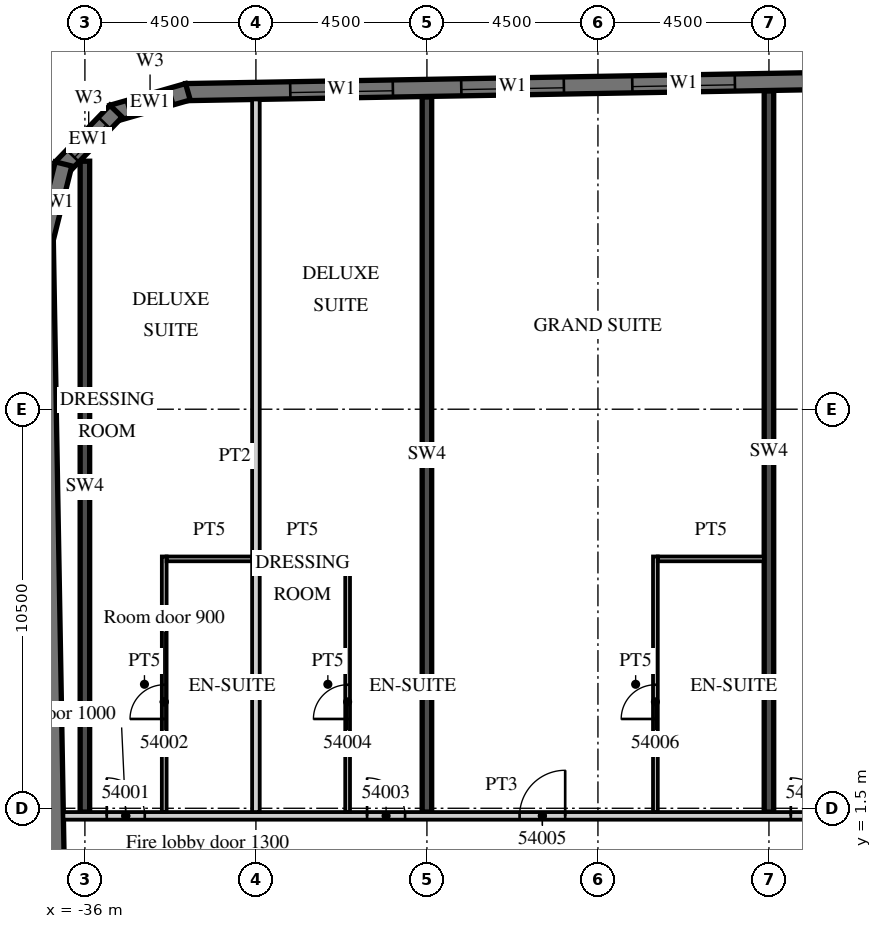
"""IFC4 building model, lengths in metres.
Left out: names, types, materials, properties, quantities, classifications, styles, units other than length and angle.
Written with IfcOpenShell. Run it as: python <this file> out.ifc"""

import sys

from ifc_helpers import new_model, si_unit, direction, frame, frame_2d, origin, place, context, subcontext, project, spatial, polyline, rectangle, outline, extrude, element, fill, save


model = new_model("IFC4")
c1 = context("Model", 3, precision=1e-05, world=origin(), true_north=direction((0.0, 1.0)))
c2 = subcontext(c1, "Body", "Model", "MODEL_VIEW")
j1 = project(units=[si_unit("LENGTHUNIT", "METRE"), si_unit("PLANEANGLEUNIT", "RADIAN")], contexts=[c1])
p1 = place(None, origin())
s1 = spatial("IfcSite", under=j1, at=p1, CompositionType="ELEMENT")
p2 = place(p1, origin())
s2 = spatial("IfcBuilding", under=s1, at=p2, CompositionType="ELEMENT")
p3 = place(p2, frame((0.0, 0.0, 224.3)))
s3 = spatial("IfcBuildingStorey", under=s2, at=p3, CompositionType="ELEMENT", Elevation=224.3)
p4 = place(p3, frame((-36.0, 1.4, 0.0), z_axis=(0.0, 0.0, 1.0), x_axis=(0.0, 1.0, 0.0)))
e1 = element("IfcWall", 1, at=p4, inside=s3, PredefinedType="SHEAR", context=c2, shape_type="SweptSolid", body=[
    extrude(rectangle(XDim=17.125, YDim=0.25, at=frame_2d((8.563, 0.0))), origin(), (0.0, 0.0, 1.0), 3.3),
])
p5 = place(p3, frame((-27.0, 1.4, 0.0), z_axis=(0.0, 0.0, 1.0), x_axis=(0.0, 1.0, 0.0)))
e2 = element("IfcWall", 2, at=p5, inside=s3, PredefinedType="SHEAR", context=c2, shape_type="SweptSolid", body=[
    extrude(rectangle(XDim=18.817, YDim=0.25, at=frame_2d((9.409, 0.0))), origin(), (0.0, 0.0, 1.0), 3.3),
])
p6 = place(p3, frame((-18.0, 1.4, 0.0), z_axis=(0.0, 0.0, 1.0), x_axis=(0.0, 1.0, 0.0)))
e3 = element("IfcWall", 3, at=p6, inside=s3, PredefinedType="SHEAR", context=c2, shape_type="SweptSolid", body=[
    extrude(rectangle(XDim=18.974, YDim=0.25, at=frame_2d((9.487, 0.0))), origin(), (0.0, 0.0, 1.0), 3.3),
])
p7 = place(p3, frame((-37.057, 16.503, 0.0), z_axis=(0.0, 0.0, 1.0), x_axis=(0.017452279857, -0.999847697366, 0.0)))
e4 = element("IfcWall", 4, at=p7, inside=s3, PredefinedType="SOLIDWALL", context=c2, shape_type="SweptSolid", body=[
    extrude(rectangle(XDim=33.0, YDim=0.45, at=frame_2d((16.5, 0.0))), origin(), (0.0, 0.0, 1.0), 3.02),
])
p8 = place(p3, frame((13.504, 21.161, 0.0), z_axis=(0.0, 0.0, 1.0), x_axis=(-0.999847763257, -0.017448504532, 0.0)))
e5 = element("IfcWall", 5, at=p8, inside=s3, PredefinedType="SOLIDWALL", context=c2, shape_type="SweptSolid", body=[
    extrude(rectangle(XDim=46.859, YDim=0.45, at=frame_2d((23.43, 0.0))), origin(), (0.0, 0.0, 1.0), 3.02),
])
p9 = place(p8, frame((0.9, 0.0, 0.45)))
e6 = element("IfcOpeningElement", 6, at=p9, cuts=e5, PredefinedType="OPENING", context=c2, shape_type="SweptSolid", body=[
    extrude(rectangle(XDim=2.7, YDim=2.25, at=frame_2d((1.35, 1.125))), frame((0.0, 0.235, 0.0), z_axis=(0.0, -1.0, 0.0), x_axis=(1.0, 0.0, 0.0)), (0.0, 0.0, 1.0), 0.47),
])
p10 = place(p8, frame((5.401, 0.0, 0.45)))
e7 = element("IfcOpeningElement", 7, at=p10, cuts=e5, PredefinedType="OPENING", context=c2, shape_type="SweptSolid", body=[
    extrude(rectangle(XDim=2.7, YDim=2.25, at=frame_2d((1.35, 1.125))), frame((0.0, 0.235, 0.0), z_axis=(0.0, -1.0, 0.0), x_axis=(1.0, 0.0, 0.0)), (0.0, 0.0, 1.0), 0.47),
])
p11 = place(p8, frame((9.902, 0.0, 0.45)))
e8 = element("IfcOpeningElement", 8, at=p11, cuts=e5, PredefinedType="OPENING", context=c2, shape_type="SweptSolid", body=[
    extrude(rectangle(XDim=2.7, YDim=2.25, at=frame_2d((1.35, 1.125))), frame((0.0, 0.235, 0.0), z_axis=(0.0, -1.0, 0.0), x_axis=(1.0, 0.0, 0.0)), (0.0, 0.0, 1.0), 0.47),
])
p12 = place(p8, frame((14.402, 0.0, 0.45)))
e9 = element("IfcOpeningElement", 9, at=p12, cuts=e5, PredefinedType="OPENING", context=c2, shape_type="SweptSolid", body=[
    extrude(rectangle(XDim=2.7, YDim=2.25, at=frame_2d((1.35, 1.125))), frame((0.0, 0.235, 0.0), z_axis=(0.0, -1.0, 0.0), x_axis=(1.0, 0.0, 0.0)), (0.0, 0.0, 1.0), 0.47),
])
p13 = place(p8, frame((18.903, 0.0, 0.45)))
e10 = element("IfcOpeningElement", 10, at=p13, cuts=e5, PredefinedType="OPENING", context=c2, shape_type="SweptSolid", body=[
    extrude(rectangle(XDim=2.7, YDim=2.25, at=frame_2d((1.35, 1.125))), frame((0.0, 0.235, 0.0), z_axis=(0.0, -1.0, 0.0), x_axis=(1.0, 0.0, 0.0)), (0.0, 0.0, 1.0), 0.47),
])
p14 = place(p8, frame((23.404, 0.0, 0.45)))
e11 = element("IfcOpeningElement", 11, at=p14, cuts=e5, PredefinedType="OPENING", context=c2, shape_type="SweptSolid", body=[
    extrude(rectangle(XDim=2.7, YDim=2.25, at=frame_2d((1.35, 1.125))), frame((0.0, 0.235, 0.0), z_axis=(0.0, -1.0, 0.0), x_axis=(1.0, 0.0, 0.0)), (0.0, 0.0, 1.0), 0.47),
])
p15 = place(p8, frame((27.904, 0.0, 0.45)))
e12 = element("IfcOpeningElement", 12, at=p15, cuts=e5, PredefinedType="OPENING", context=c2, shape_type="SweptSolid", body=[
    extrude(rectangle(XDim=2.7, YDim=2.25, at=frame_2d((1.35, 1.125))), frame((0.0, 0.235, 0.0), z_axis=(0.0, -1.0, 0.0), x_axis=(1.0, 0.0, 0.0)), (0.0, 0.0, 1.0), 0.47),
])
p16 = place(p8, frame((32.405, 0.0, 0.45)))
e13 = element("IfcOpeningElement", 13, at=p16, cuts=e5, PredefinedType="OPENING", context=c2, shape_type="SweptSolid", body=[
    extrude(rectangle(XDim=2.7, YDim=2.25, at=frame_2d((1.35, 1.125))), frame((0.0, 0.235, 0.0), z_axis=(0.0, -1.0, 0.0), x_axis=(1.0, 0.0, 0.0)), (0.0, 0.0, 1.0), 0.47),
])
p17 = place(p8, frame((36.906, 0.0, 0.45)))
e14 = element("IfcOpeningElement", 14, at=p17, cuts=e5, PredefinedType="OPENING", context=c2, shape_type="SweptSolid", body=[
    extrude(rectangle(XDim=2.7, YDim=2.25, at=frame_2d((1.35, 1.125))), frame((0.0, 0.235, 0.0), z_axis=(0.0, -1.0, 0.0), x_axis=(1.0, 0.0, 0.0)), (0.0, 0.0, 1.0), 0.47),
])
p18 = place(p8, frame((41.406, 0.0, 0.45)))
e15 = element("IfcOpeningElement", 15, at=p18, cuts=e5, PredefinedType="OPENING", context=c2, shape_type="SweptSolid", body=[
    extrude(rectangle(XDim=2.7, YDim=2.25, at=frame_2d((1.35, 1.125))), frame((0.0, 0.235, 0.0), z_axis=(0.0, -1.0, 0.0), x_axis=(1.0, 0.0, 0.0)), (0.0, 0.0, 1.0), 0.47),
])
p19 = place(p3, frame((-33.29, 20.352, 0.0), z_axis=(0.0, 0.0, 1.0), x_axis=(-0.961247584925, -0.275686562016, 0.0)))
e16 = element("IfcWall", 16, at=p19, inside=s3, PredefinedType="SOLIDWALL", context=c2, shape_type="SweptSolid", body=[
    extrude(outline(polyline([(0.0, -0.225), (2.071, -0.225), (1.95, 0.225), (0.121, 0.225), (0.0, -0.225)])), origin(), (0.0, 0.0, 1.0), 3.02),
])
p20 = place(p19, frame((0.435, 0.0, 0.45)))
e17 = element("IfcOpeningElement", 17, at=p20, cuts=e16, PredefinedType="OPENING", context=c2, shape_type="SweptSolid", body=[
    extrude(rectangle(XDim=1.2, YDim=2.25, at=frame_2d((0.6, 1.125))), frame((0.0, 0.235, 0.0), z_axis=(0.0, -1.0, 0.0), x_axis=(1.0, 0.0, 0.0)), (0.0, 0.0, 1.0), 0.47),
])
p21 = place(p3, frame((-35.181, 19.842, 0.0), z_axis=(0.0, 0.0, 1.0), x_axis=(-0.694678672846, -0.719320193998, 0.0)))
e18 = element("IfcWall", 18, at=p21, inside=s3, PredefinedType="SOLIDWALL", context=c2, shape_type="SweptSolid", body=[
    extrude(outline(polyline([(0.0, -0.225), (2.071, -0.225), (1.95, 0.225), (0.121, 0.225), (0.0, -0.225)])), origin(), (0.0, 0.0, 1.0), 3.02),
])
p22 = place(p21, frame((0.435, 0.0, 0.45)))
e19 = element("IfcOpeningElement", 19, at=p22, cuts=e18, PredefinedType="OPENING", context=c2, shape_type="SweptSolid", body=[
    extrude(rectangle(XDim=1.2, YDim=2.25, at=frame_2d((0.6, 1.125))), frame((0.0, 0.235, 0.0), z_axis=(0.0, -1.0, 0.0), x_axis=(1.0, 0.0, 0.0)), (0.0, 0.0, 1.0), 0.47),
])
p23 = place(p3, frame((-36.563, 18.454, 0.0), z_axis=(0.0, 0.0, 1.0), x_axis=(-0.241869623482, -0.970308757683, 0.0)))
e20 = element("IfcWall", 20, at=p23, inside=s3, PredefinedType="SOLIDWALL", context=c2, shape_type="SweptSolid", body=[
    extrude(outline(polyline([(-0.0, -0.225), (2.07, -0.225), (1.95, 0.225), (0.12, 0.225), (-0.0, -0.225)])), origin(), (0.0, 0.0, 1.0), 3.02),
])
p24 = place(p3, frame((-36.566, 1.3, 0.0), z_axis=(0.0, 0.0, 1.0), x_axis=(1.0, 0.0, 0.0)))
e21 = element("IfcWall", 21, at=p24, inside=s3, PredefinedType="PARTITIONING", context=c2, shape_type="SweptSolid", body=[
    extrude(rectangle(XDim=23.066, YDim=0.2, at=frame_2d((11.533, 0.0))), origin(), (0.0, 0.0, 1.0), 3.02),
])
p25 = place(p24, frame((1.141, 0.0, 0.0)))
e22 = element("IfcOpeningElement", 22, at=p25, cuts=e21, PredefinedType="OPENING", context=c2, shape_type="SweptSolid", body=[
    extrude(rectangle(XDim=1.0, YDim=2.1, at=frame_2d((0.5, 1.05))), frame((0.0, 0.11, 0.0), z_axis=(0.0, -1.0, 0.0), x_axis=(1.0, 0.0, 0.0)), (0.0, 0.0, 1.0), 0.22),
])
p26 = place(p24, frame((7.991, 0.0, 0.0)))
e23 = element("IfcOpeningElement", 23, at=p26, cuts=e21, PredefinedType="OPENING", context=c2, shape_type="SweptSolid", body=[
    extrude(rectangle(XDim=1.0, YDim=2.1, at=frame_2d((0.5, 1.05))), frame((0.0, 0.11, 0.0), z_axis=(0.0, -1.0, 0.0), x_axis=(1.0, 0.0, 0.0)), (0.0, 0.0, 1.0), 0.22),
])
p27 = place(p24, frame((12.004, 0.0, 0.0)))
e24 = element("IfcOpeningElement", 24, at=p27, cuts=e21, PredefinedType="OPENING", context=c2, shape_type="SweptSolid", body=[
    extrude(rectangle(XDim=1.2, YDim=2.1, at=frame_2d((0.6, 1.05))), frame((0.0, 0.11, 0.0), z_axis=(0.0, -1.0, 0.0), x_axis=(1.0, 0.0, 0.0)), (0.0, 0.0, 1.0), 0.22),
])
p28 = place(p24, frame((19.141, 0.0, 0.0)))
e25 = element("IfcOpeningElement", 25, at=p28, cuts=e21, PredefinedType="OPENING", context=c2, shape_type="SweptSolid", body=[
    extrude(rectangle(XDim=1.0, YDim=2.1, at=frame_2d((0.5, 1.05))), frame((0.0, 0.11, 0.0), z_axis=(0.0, -1.0, 0.0), x_axis=(1.0, 0.0, 0.0)), (0.0, 0.0, 1.0), 0.22),
])
p29 = place(p3, frame((-31.5, 1.4, 0.0), z_axis=(0.0, 0.0, 1.0), x_axis=(0.0, 1.0, 0.0)))
e26 = element("IfcWall", 26, at=p29, inside=s3, PredefinedType="PARTITIONING", context=c2, shape_type="SweptSolid", body=[
    extrude(rectangle(XDim=18.751, YDim=0.2, at=frame_2d((9.375, 0.0))), origin(), (0.0, 0.0, 1.0), 3.02),
])
p30 = place(p3, frame((-33.913, 1.4, 0.0), z_axis=(0.0, 0.0, 1.0), x_axis=(0.0, 1.0, 0.0)))
e27 = element("IfcWall", 27, at=p30, inside=s3, PredefinedType="PARTITIONING", context=c2, shape_type="SweptSolid", body=[
    extrude(rectangle(XDim=6.725, YDim=0.125, at=frame_2d((3.363, 0.0))), origin(), (0.0, 0.0, 1.0), 3.02),
])
p31 = place(p30, frame((2.45, 0.0, 0.0)))
e28 = element("IfcOpeningElement", 28, at=p31, cuts=e27, PredefinedType="OPENING", context=c2, shape_type="SweptSolid", body=[
    extrude(rectangle(XDim=0.9, YDim=2.1, at=frame_2d((0.45, 1.05))), frame((0.0, 0.073, 0.0), z_axis=(0.0, -1.0, 0.0), x_axis=(1.0, 0.0, 0.0)), (0.0, 0.0, 1.0), 0.145),
])
p32 = place(p3, frame((-33.85, 8.062, 0.0), z_axis=(0.0, 0.0, 1.0), x_axis=(1.0, 0.0, 0.0)))
e29 = element("IfcWall", 29, at=p32, inside=s3, PredefinedType="PARTITIONING", context=c2, shape_type="SweptSolid", body=[
    extrude(rectangle(XDim=2.25, YDim=0.125, at=frame_2d((1.125, 0.0))), origin(), (0.0, 0.0, 1.0), 3.02),
])
p33 = place(p3, frame((-29.087, 1.4, 0.0), z_axis=(0.0, 0.0, 1.0), x_axis=(0.0, 1.0, 0.0)))
e30 = element("IfcWall", 30, at=p33, inside=s3, PredefinedType="PARTITIONING", context=c2, shape_type="SweptSolid", body=[
    extrude(rectangle(XDim=6.725, YDim=0.125, at=frame_2d((3.363, 0.0))), origin(), (0.0, 0.0, 1.0), 3.02),
])
p34 = place(p33, frame((2.45, 0.0, 0.0)))
e31 = element("IfcOpeningElement", 31, at=p34, cuts=e30, PredefinedType="OPENING", context=c2, shape_type="SweptSolid", body=[
    extrude(rectangle(XDim=0.9, YDim=2.1, at=frame_2d((0.45, 1.05))), frame((0.0, 0.073, 0.0), z_axis=(0.0, -1.0, 0.0), x_axis=(1.0, 0.0, 0.0)), (0.0, 0.0, 1.0), 0.145),
])
p35 = place(p3, frame((-31.4, 8.062, 0.0), z_axis=(0.0, 0.0, 1.0), x_axis=(1.0, 0.0, 0.0)))
e32 = element("IfcWall", 32, at=p35, inside=s3, PredefinedType="PARTITIONING", context=c2, shape_type="SweptSolid", body=[
    extrude(rectangle(XDim=2.25, YDim=0.125, at=frame_2d((1.125, 0.0))), origin(), (0.0, 0.0, 1.0), 3.02),
])
p36 = place(p3, frame((-20.988, 1.4, 0.0), z_axis=(0.0, 0.0, 1.0), x_axis=(0.0, 1.0, 0.0)))
e33 = element("IfcWall", 33, at=p36, inside=s3, PredefinedType="PARTITIONING", context=c2, shape_type="SweptSolid", body=[
    extrude(rectangle(XDim=6.725, YDim=0.125, at=frame_2d((3.363, 0.0))), origin(), (0.0, 0.0, 1.0), 3.02),
])
p37 = place(p36, frame((2.45, 0.0, 0.0)))
e34 = element("IfcOpeningElement", 34, at=p37, cuts=e33, PredefinedType="OPENING", context=c2, shape_type="SweptSolid", body=[
    extrude(rectangle(XDim=0.9, YDim=2.1, at=frame_2d((0.45, 1.05))), frame((0.0, 0.073, 0.0), z_axis=(0.0, -1.0, 0.0), x_axis=(1.0, 0.0, 0.0)), (0.0, 0.0, 1.0), 0.145),
])
p38 = place(p3, frame((-20.925, 8.062, 0.0), z_axis=(0.0, 0.0, 1.0), x_axis=(1.0, 0.0, 0.0)))
e35 = element("IfcWall", 35, at=p38, inside=s3, PredefinedType="PARTITIONING", context=c2, shape_type="SweptSolid", body=[
    extrude(rectangle(XDim=2.8, YDim=0.125, at=frame_2d((1.4, 0.0))), origin(), (0.0, 0.0, 1.0), 3.02),
])
p39 = place(p16, origin())
e36 = element("IfcWindow", 36, at=p39, inside=s3, PartitioningType="SINGLE_PANEL", PredefinedType="WINDOW", context=c2, shape_type="SweptSolid", body=[
    extrude(rectangle(XDim=2.7, YDim=2.25, at=frame_2d((1.35, 1.125))), frame((0.0, 0.09, 0.0), z_axis=(0.0, -1.0, 0.0), x_axis=(1.0, 0.0, 0.0)), (0.0, 0.0, 1.0), 0.06),
])
fill(e13, e36)
p40 = place(p17, origin())
e37 = element("IfcWindow", 37, at=p40, inside=s3, PartitioningType="SINGLE_PANEL", PredefinedType="WINDOW", context=c2, shape_type="SweptSolid", body=[
    extrude(rectangle(XDim=2.7, YDim=2.25, at=frame_2d((1.35, 1.125))), frame((0.0, 0.09, 0.0), z_axis=(0.0, -1.0, 0.0), x_axis=(1.0, 0.0, 0.0)), (0.0, 0.0, 1.0), 0.06),
])
fill(e14, e37)
p41 = place(p18, origin())
e38 = element("IfcWindow", 38, at=p41, inside=s3, PartitioningType="SINGLE_PANEL", PredefinedType="WINDOW", context=c2, shape_type="SweptSolid", body=[
    extrude(rectangle(XDim=2.7, YDim=2.25, at=frame_2d((1.35, 1.125))), frame((0.0, 0.09, 0.0), z_axis=(0.0, -1.0, 0.0), x_axis=(1.0, 0.0, 0.0)), (0.0, 0.0, 1.0), 0.06),
])
fill(e15, e38)
p42 = place(p20, origin())
e39 = element("IfcWindow", 39, at=p42, inside=s3, PartitioningType="SINGLE_PANEL", PredefinedType="WINDOW", context=c2, shape_type="SweptSolid", body=[
    extrude(rectangle(XDim=1.2, YDim=2.25, at=frame_2d((0.6, 1.125))), frame((0.0, 0.09, 0.0), z_axis=(0.0, -1.0, 0.0), x_axis=(1.0, 0.0, 0.0)), (0.0, 0.0, 1.0), 0.06),
])
fill(e17, e39)
p43 = place(p22, origin())
e40 = element("IfcWindow", 40, at=p43, inside=s3, PartitioningType="SINGLE_PANEL", PredefinedType="WINDOW", context=c2, shape_type="SweptSolid", body=[
    extrude(rectangle(XDim=1.2, YDim=2.25, at=frame_2d((0.6, 1.125))), frame((0.0, 0.09, 0.0), z_axis=(0.0, -1.0, 0.0), x_axis=(1.0, 0.0, 0.0)), (0.0, 0.0, 1.0), 0.06),
])
fill(e19, e40)
p44 = place(p25, origin())
e41 = element("IfcDoor", 41, at=p44, inside=s3, OperationType="SINGLE_SWING_LEFT", PredefinedType="DOOR", context=c2, shape_type="SweptSolid", body=[
    extrude(rectangle(XDim=1.0, YDim=2.1, at=frame_2d((0.5, 1.05))), frame((0.0, 0.025, 0.0), z_axis=(0.0, -1.0, 0.0), x_axis=(1.0, 0.0, 0.0)), (0.0, 0.0, 1.0), 0.05),
])
fill(e22, e41)
p45 = place(p31, origin())
e42 = element("IfcDoor", 42, at=p45, inside=s3, OperationType="SINGLE_SWING_LEFT", PredefinedType="DOOR", context=c2, shape_type="SweptSolid", body=[
    extrude(rectangle(XDim=0.9, YDim=2.1, at=frame_2d((0.45, 1.05))), frame((0.0, 0.025, 0.0), z_axis=(0.0, -1.0, 0.0), x_axis=(1.0, 0.0, 0.0)), (0.0, 0.0, 1.0), 0.05),
])
fill(e28, e42)
p46 = place(p26, origin())
e43 = element("IfcDoor", 43, at=p46, inside=s3, OperationType="SINGLE_SWING_LEFT", PredefinedType="DOOR", context=c2, shape_type="SweptSolid", body=[
    extrude(rectangle(XDim=1.0, YDim=2.1, at=frame_2d((0.5, 1.05))), frame((0.0, 0.025, 0.0), z_axis=(0.0, -1.0, 0.0), x_axis=(1.0, 0.0, 0.0)), (0.0, 0.0, 1.0), 0.05),
])
fill(e23, e43)
p47 = place(p34, origin())
e44 = element("IfcDoor", 44, at=p47, inside=s3, OperationType="SINGLE_SWING_LEFT", PredefinedType="DOOR", context=c2, shape_type="SweptSolid", body=[
    extrude(rectangle(XDim=0.9, YDim=2.1, at=frame_2d((0.45, 1.05))), frame((0.0, 0.025, 0.0), z_axis=(0.0, -1.0, 0.0), x_axis=(1.0, 0.0, 0.0)), (0.0, 0.0, 1.0), 0.05),
])
fill(e31, e44)
p48 = place(p27, origin())
e45 = element("IfcDoor", 45, at=p48, inside=s3, OperationType="SINGLE_SWING_RIGHT", PredefinedType="DOOR", context=c2, shape_type="SweptSolid", body=[
    extrude(rectangle(XDim=1.2, YDim=2.1, at=frame_2d((0.6, 1.05))), frame((0.0, 0.025, 0.0), z_axis=(0.0, -1.0, 0.0), x_axis=(1.0, 0.0, 0.0)), (0.0, 0.0, 1.0), 0.05),
])
fill(e24, e45)
p49 = place(p37, origin())
e46 = element("IfcDoor", 46, at=p49, inside=s3, OperationType="SINGLE_SWING_LEFT", PredefinedType="DOOR", context=c2, shape_type="SweptSolid", body=[
    extrude(rectangle(XDim=0.9, YDim=2.1, at=frame_2d((0.45, 1.05))), frame((0.0, 0.025, 0.0), z_axis=(0.0, -1.0, 0.0), x_axis=(1.0, 0.0, 0.0)), (0.0, 0.0, 1.0), 0.05),
])
fill(e34, e46)
p50 = place(p28, origin())
e47 = element("IfcDoor", 47, at=p50, inside=s3, OperationType="SINGLE_SWING_LEFT", PredefinedType="DOOR", context=c2, shape_type="SweptSolid", body=[
    extrude(rectangle(XDim=1.0, YDim=2.1, at=frame_2d((0.5, 1.05))), frame((0.0, 0.025, 0.0), z_axis=(0.0, -1.0, 0.0), x_axis=(1.0, 0.0, 0.0)), (0.0, 0.0, 1.0), 0.05),
])
fill(e25, e47)
save(model, sys.argv[1])
